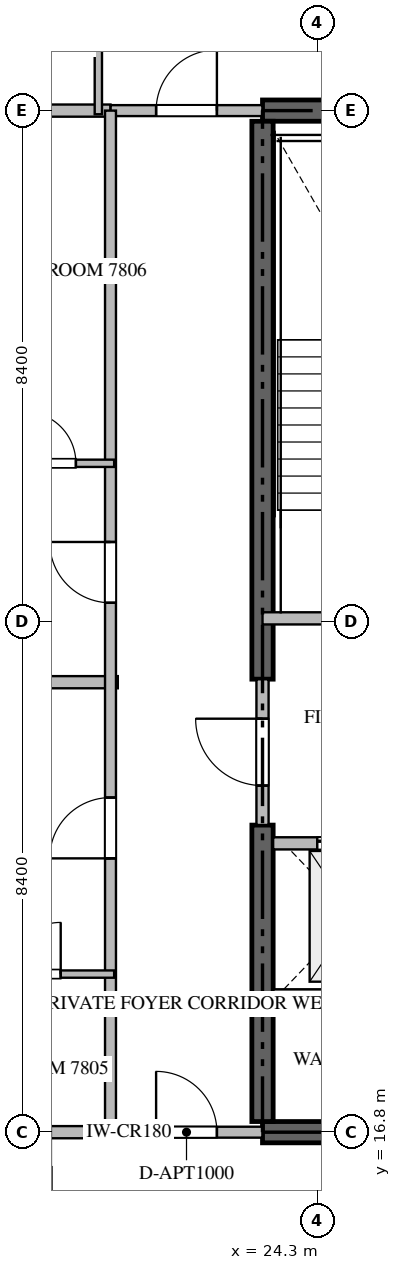
"""IFC4 building model, lengths in metres.
Left out: names, types, materials, properties, quantities, classifications, styles, units other than length and angle.
Written with IfcOpenShell. Run it as: python <this file> out.ifc"""

import sys

from ifc_helpers import new_model, si_unit, direction, frame, frame_2d, origin, place, context, subcontext, project, spatial, rectangle, extrude, source, transform, mapped, element, fill, save


model = new_model("IFC4")
c1 = context("Model", 3, precision=1e-05, world=origin(), true_north=direction((0.0, 1.0)))
c2 = subcontext(c1, "Body", "Model", "MODEL_VIEW")
j1 = project(units=[si_unit("LENGTHUNIT", "METRE"), si_unit("PLANEANGLEUNIT", "RADIAN")], contexts=[c1])
p1 = place(None, origin())
s1 = spatial("IfcSite", under=j1, at=p1, CompositionType="ELEMENT")
p2 = place(p1, origin())
s2 = spatial("IfcBuilding", under=s1, at=p2, CompositionType="ELEMENT")
p3 = place(p2, frame((0.0, 0.0, 313.7)))
s3 = spatial("IfcBuildingStorey", under=s2, at=p3, CompositionType="ELEMENT", Elevation=313.7)
for number, where, z_axis, x_axis in (
    (1, (23.4, 16.8, -0.26), (0.0, 0.0, 1.0), (1.0, 0.0, 0.0)),
    (2, (41.4, 33.6, -0.26), (0.0, 0.0, 1.0), (-1.0, 0.0, 0.0)),
):
    element("IfcWall", number, at=place(p3, frame(where, z_axis=z_axis, x_axis=x_axis)), inside=s3, PredefinedType="SHEAR", context=c2, shape_type="SweptSolid", body=[
        extrude(rectangle(XDim=18.0, YDim=0.35, at=frame_2d((9.0, 0.0))), origin(), (0.0, 0.0, 1.0), 4.048),
    ])
p4 = place(p3, frame((23.4, 16.975, -0.26), z_axis=(0.0, 0.0, 1.0), x_axis=(0.0, 1.0, 0.0)))
e3 = element("IfcWall", 3, at=p4, inside=s3, PredefinedType="SHEAR", context=c2, shape_type="SweptSolid", body=[
    extrude(rectangle(XDim=4.875, YDim=0.35, at=frame_2d((2.438, 0.0))), origin(), (0.0, 0.0, 1.0), 4.048),
])
p5 = place(p3, frame((23.4, 24.25, -0.26), z_axis=(0.0, 0.0, 1.0), x_axis=(0.0, 1.0, 0.0)))
e4 = element("IfcWall", 4, at=p5, inside=s3, PredefinedType="SHEAR", context=c2, shape_type="SweptSolid", body=[
    extrude(rectangle(XDim=9.175, YDim=0.35, at=frame_2d((4.587, 0.0))), origin(), (0.0, 0.0, 1.0), 4.048),
])
p6 = place(p3, frame((23.4, 25.25, 0.0), z_axis=(0.0, 0.0, 1.0), x_axis=(1.0, 0.0, 0.0)))
e5 = element("IfcWall", 5, at=p6, inside=s3, PredefinedType="STANDARD", context=c2, shape_type="SweptSolid", body=[
    extrude(rectangle(XDim=4.45, YDim=0.2, at=frame_2d((2.225, 0.0))), origin(), (0.0, 0.0, 1.0), 3.79),
])
p7 = place(p6, frame((1.65, 0.0, 0.0)))
e6 = element("IfcOpeningElement", 6, at=p7, cuts=e5, PredefinedType="OPENING", context=c2, shape_type="SweptSolid", body=[
    extrude(rectangle(XDim=1.1, YDim=2.15, at=frame_2d((0.55, 1.075))), frame((0.0, 0.11, 0.0), z_axis=(0.0, -1.0, 0.0), x_axis=(1.0, 0.0, 0.0)), (0.0, 0.0, 1.0), 0.22),
])
p8 = place(p3, frame((23.575, 21.55, 0.0), z_axis=(0.0, 0.0, 1.0), x_axis=(1.0, 0.0, 0.0)))
e7 = element("IfcWall", 7, at=p8, inside=s3, PredefinedType="STANDARD", context=c2, shape_type="SweptSolid", body=[
    extrude(rectangle(XDim=2.475, YDim=0.2, at=frame_2d((1.238, 0.0))), origin(), (0.0, 0.0, 1.0), 3.79),
])
p9 = place(p8, frame((0.725, 0.0, 0.0)))
e8 = element("IfcOpeningElement", 8, at=p9, cuts=e7, PredefinedType="OPENING", context=c2, shape_type="SweptSolid", body=[
    extrude(rectangle(XDim=1.2, YDim=2.2, at=frame_2d((0.6, 1.1))), frame((0.0, 0.11, 0.0), z_axis=(0.0, -1.0, 0.0), x_axis=(1.0, 0.0, 0.0)), (0.0, 0.0, 1.0), 0.22),
])
p10 = place(p3, frame((23.575, 19.05, 0.0), z_axis=(0.0, 0.0, 1.0), x_axis=(1.0, 0.0, 0.0)))
e9 = element("IfcWall", 9, at=p10, inside=s3, PredefinedType="STANDARD", context=c2, shape_type="SweptSolid", body=[
    extrude(rectangle(XDim=2.475, YDim=0.2, at=frame_2d((1.238, 0.0))), origin(), (0.0, 0.0, 1.0), 3.79),
])
p11 = place(p3, frame((23.4, 21.852, 0.0), z_axis=(0.0, 0.0, 1.0), x_axis=(0.0, 1.0, 0.0)))
e10 = element("IfcWall", 10, at=p11, inside=s3, PredefinedType="STANDARD", context=c2, shape_type="SweptSolid", body=[
    extrude(rectangle(XDim=2.396, YDim=0.2, at=frame_2d((1.198, 0.0))), origin(), (0.0, 0.0, 1.0), 3.79),
])
p12 = place(p11, frame((0.648, 0.0, 0.0)))
e11 = element("IfcOpeningElement", 11, at=p12, cuts=e10, PredefinedType="OPENING", context=c2, shape_type="SweptSolid", body=[
    extrude(rectangle(XDim=1.1, YDim=2.15, at=frame_2d((0.55, 1.075))), frame((0.0, 0.11, 0.0), z_axis=(0.0, -1.0, 0.0), x_axis=(1.0, 0.0, 0.0)), (0.0, 0.0, 1.0), 0.22),
])
p13 = place(p3, frame((9.282, 24.2, 0.0), z_axis=(0.0, 0.0, 1.0), x_axis=(1.0, 0.0, 0.0)))
e12 = element("IfcWall", 12, at=p13, inside=s3, PredefinedType="PARTITIONING", context=c2, shape_type="SweptSolid", body=[
    extrude(rectangle(XDim=11.738, YDim=0.2, at=frame_2d((5.869, 0.0))), origin(), (0.0, 0.0, 1.0), 3.79),
])
for number, where, z_axis, x_axis in (
    (13, (9.282, 16.8, 0.0), (0.0, 0.0, 1.0), (1.0, 0.0, 0.0)),
    (14, (9.282, 33.6, 0.0), (0.0, 0.0, 1.0), (1.0, 0.0, 0.0)),
):
    element("IfcWall", number, at=place(p3, frame(where, z_axis=z_axis, x_axis=x_axis)), inside=s3, PredefinedType="PARTITIONING", context=c2, shape_type="SweptSolid", body=[
        extrude(rectangle(XDim=11.618, YDim=0.2, at=frame_2d((5.809, 0.0))), origin(), (0.0, 0.0, 1.0), 3.79),
    ])
p14 = place(p3, frame((20.902, 16.8, 0.0), z_axis=(0.0, 0.0, 1.0), x_axis=(1.0, 0.0, 0.0)))
e15 = element("IfcWall", 15, at=p14, inside=s3, PredefinedType="PARTITIONING", context=c2, shape_type="SweptSolid", body=[
    extrude(rectangle(XDim=2.496, YDim=0.18, at=frame_2d((1.248, 0.0))), origin(), (0.0, 0.0, 1.0), 3.79),
])
p15 = place(p14, frame((0.748, 0.0, 0.0)))
e16 = element("IfcOpeningElement", 16, at=p15, cuts=e15, PredefinedType="OPENING", context=c2, shape_type="SweptSolid", body=[
    extrude(rectangle(XDim=1.0, YDim=2.15, at=frame_2d((0.5, 1.075))), frame((0.0, 0.1, 0.0), z_axis=(0.0, -1.0, 0.0), x_axis=(1.0, 0.0, 0.0)), (0.0, 0.0, 1.0), 0.2),
])
p16 = place(p3, frame((20.902, 33.6, 0.0), z_axis=(0.0, 0.0, 1.0), x_axis=(1.0, 0.0, 0.0)))
e17 = element("IfcWall", 17, at=p16, inside=s3, PredefinedType="PARTITIONING", context=c2, shape_type="SweptSolid", body=[
    extrude(rectangle(XDim=2.496, YDim=0.18, at=frame_2d((1.248, 0.0))), origin(), (0.0, 0.0, 1.0), 3.79),
])
p17 = place(p16, frame((0.748, 0.0, 0.0)))
e18 = element("IfcOpeningElement", 18, at=p17, cuts=e17, PredefinedType="OPENING", context=c2, shape_type="SweptSolid", body=[
    extrude(rectangle(XDim=1.0, YDim=2.15, at=frame_2d((0.5, 1.075))), frame((0.0, 0.1, 0.0), z_axis=(0.0, -1.0, 0.0), x_axis=(1.0, 0.0, 0.0)), (0.0, 0.0, 1.0), 0.2),
])
p18 = place(p3, frame((20.9, 16.8, 0.0), z_axis=(0.0, 0.0, 1.0), x_axis=(0.0, 1.0, 0.0)))
e19 = element("IfcWall", 19, at=p18, inside=s3, PredefinedType="PARTITIONING", context=c2, shape_type="SweptSolid", body=[
    extrude(rectangle(XDim=16.8, YDim=0.18, at=frame_2d((8.4, 0.0))), origin(), (0.0, 0.0, 1.0), 3.79),
])
p19 = place(p18, frame((4.503, 0.0, 0.0)))
e20 = element("IfcOpeningElement", 20, at=p19, cuts=e19, PredefinedType="OPENING", context=c2, shape_type="SweptSolid", body=[
    extrude(rectangle(XDim=1.0, YDim=2.15, at=frame_2d((0.5, 1.075))), frame((0.0, 0.1, 0.0), z_axis=(0.0, -1.0, 0.0), x_axis=(1.0, 0.0, 0.0)), (0.0, 0.0, 1.0), 0.2),
])
p20 = place(p18, frame((8.706, 0.0, 0.0)))
e21 = element("IfcOpeningElement", 21, at=p20, cuts=e19, PredefinedType="OPENING", context=c2, shape_type="SweptSolid", body=[
    extrude(rectangle(XDim=1.0, YDim=2.15, at=frame_2d((0.5, 1.075))), frame((0.0, 0.1, 0.0), z_axis=(0.0, -1.0, 0.0), x_axis=(1.0, 0.0, 0.0)), (0.0, 0.0, 1.0), 0.2),
])
p21 = place(p3, frame((20.7, 36.35, 0.0), z_axis=(0.0, 0.0, 1.0), x_axis=(0.0, -1.0, 0.0)))
e22 = element("IfcWall", 22, at=p21, inside=s3, PredefinedType="PARTITIONING", context=c2, shape_type="SweptSolid", body=[
    extrude(rectangle(XDim=2.81, YDim=0.12, at=frame_2d((1.405, 0.0))), origin(), (0.0, 0.0, 1.0), 3.79),
])
p22 = place(p3, frame((18.352, 19.4, 0.0), z_axis=(0.0, 0.0, 1.0), x_axis=(1.0, 0.0, 0.0)))
e23 = element("IfcWall", 23, at=p22, inside=s3, PredefinedType="PARTITIONING", context=c2, shape_type="SweptSolid", body=[
    extrude(rectangle(XDim=2.608, YDim=0.12, at=frame_2d((1.304, 0.0))), origin(), (0.0, 0.0, 1.0), 3.79),
])
p23 = place(p22, frame((0.879, 0.0, 0.0)))
e24 = element("IfcOpeningElement", 24, at=p23, cuts=e23, PredefinedType="OPENING", context=c2, shape_type="SweptSolid", body=[
    extrude(rectangle(XDim=0.85, YDim=2.1, at=frame_2d((0.425, 1.05))), frame((0.0, 0.07, 0.0), z_axis=(0.0, -1.0, 0.0), x_axis=(1.0, 0.0, 0.0)), (0.0, 0.0, 1.0), 0.14),
])
p24 = place(p3, frame((18.852, 27.8, 0.0), z_axis=(0.0, 0.0, 1.0), x_axis=(1.0, 0.0, 0.0)))
e25 = element("IfcWall", 25, at=p24, inside=s3, PredefinedType="PARTITIONING", context=c2, shape_type="SweptSolid", body=[
    extrude(rectangle(XDim=2.108, YDim=0.12, at=frame_2d((1.054, 0.0))), origin(), (0.0, 0.0, 1.0), 3.79),
])
p25 = place(p24, frame((0.629, 0.0, 0.0)))
e26 = element("IfcOpeningElement", 26, at=p25, cuts=e25, PredefinedType="OPENING", context=c2, shape_type="SweptSolid", body=[
    extrude(rectangle(XDim=0.85, YDim=2.1, at=frame_2d((0.425, 1.05))), frame((0.0, 0.07, 0.0), z_axis=(0.0, -1.0, 0.0), x_axis=(1.0, 0.0, 0.0)), (0.0, 0.0, 1.0), 0.14),
])
m1 = source(origin(), c2, "Body", "SweptSolid", [
    extrude(rectangle(XDim=1.2, YDim=2.2, at=frame_2d((0.6, 1.1))), frame((0.0, 0.025, 0.0), z_axis=(0.0, -1.0, 0.0), x_axis=(1.0, 0.0, 0.0)), (0.0, 0.0, 1.0), 0.05),
])
p26 = place(p9, origin())
e27 = element("IfcDoor", 27, at=p26, inside=s3, OperationType="DOUBLE_DOOR_SLIDING", PredefinedType="DOOR", context=c2, shape_type="MappedRepresentation", body=[
    mapped(m1, transform((0.0, 0.0, 0.0), scale=1.0)),
])
fill(e8, e27)
m2 = source(origin(), c2, "Body", "SweptSolid", [
    extrude(rectangle(XDim=1.1, YDim=2.15, at=frame_2d((0.55, 1.075))), frame((0.0, 0.025, 0.0), z_axis=(0.0, -1.0, 0.0), x_axis=(1.0, 0.0, 0.0)), (0.0, 0.0, 1.0), 0.05),
])
p27 = place(p12, origin())
e28 = element("IfcDoor", 28, at=p27, inside=s3, OperationType="SINGLE_SWING_RIGHT", PredefinedType="DOOR", context=c2, shape_type="MappedRepresentation", body=[
    mapped(m2, transform((0.0, 0.0, 0.0), scale=1.0)),
])
fill(e11, e28)
m3 = source(origin(), c2, "Body", "SweptSolid", [
    extrude(rectangle(XDim=1.0, YDim=2.15, at=frame_2d((0.5, 1.075))), frame((0.0, 0.025, 0.0), z_axis=(0.0, -1.0, 0.0), x_axis=(1.0, 0.0, 0.0)), (0.0, 0.0, 1.0), 0.05),
])
p28 = place(p15, origin())
e29 = element("IfcDoor", 29, at=p28, inside=s3, OperationType="SINGLE_SWING_LEFT", PredefinedType="DOOR", context=c2, shape_type="MappedRepresentation", body=[
    mapped(m3, transform((0.0, 0.0, 0.0), scale=1.0)),
])
fill(e16, e29)
p29 = place(p17, origin())
e30 = element("IfcDoor", 30, at=p29, inside=s3, OperationType="SINGLE_SWING_RIGHT", PredefinedType="DOOR", context=c2, shape_type="MappedRepresentation", body=[
    mapped(m3, transform((0.0, 0.0, 0.0), scale=1.0)),
])
fill(e18, e30)
p30 = place(p19, origin())
e31 = element("IfcDoor", 31, at=p30, inside=s3, OperationType="SINGLE_SWING_LEFT", PredefinedType="DOOR", context=c2, shape_type="MappedRepresentation", body=[
    mapped(m3, transform((0.0, 0.0, 0.0), scale=1.0)),
])
fill(e20, e31)
p31 = place(p20, origin())
e32 = element("IfcDoor", 32, at=p31, inside=s3, OperationType="SINGLE_SWING_RIGHT", PredefinedType="DOOR", context=c2, shape_type="MappedRepresentation", body=[
    mapped(m3, transform((0.0, 0.0, 0.0), scale=1.0)),
])
fill(e21, e32)
m4 = source(origin(), c2, "Body", "SweptSolid", [
    extrude(rectangle(XDim=0.85, YDim=2.1, at=frame_2d((0.425, 1.05))), frame((0.0, 0.025, 0.0), z_axis=(0.0, -1.0, 0.0), x_axis=(1.0, 0.0, 0.0)), (0.0, 0.0, 1.0), 0.05),
])
p32 = place(p23, origin())
e33 = element("IfcDoor", 33, at=p32, inside=s3, OperationType="SINGLE_SWING_RIGHT", PredefinedType="DOOR", context=c2, shape_type="MappedRepresentation", body=[
    mapped(m4, transform((0.0, 0.0, 0.0), scale=1.0)),
])
fill(e24, e33)
p33 = place(p25, origin())
e34 = element("IfcDoor", 34, at=p33, inside=s3, OperationType="SINGLE_SWING_LEFT", PredefinedType="DOOR", context=c2, shape_type="MappedRepresentation", body=[
    mapped(m4, transform((0.0, 0.0, 0.0), scale=1.0)),
])
fill(e26, e34)
save(model, sys.argv[1])
